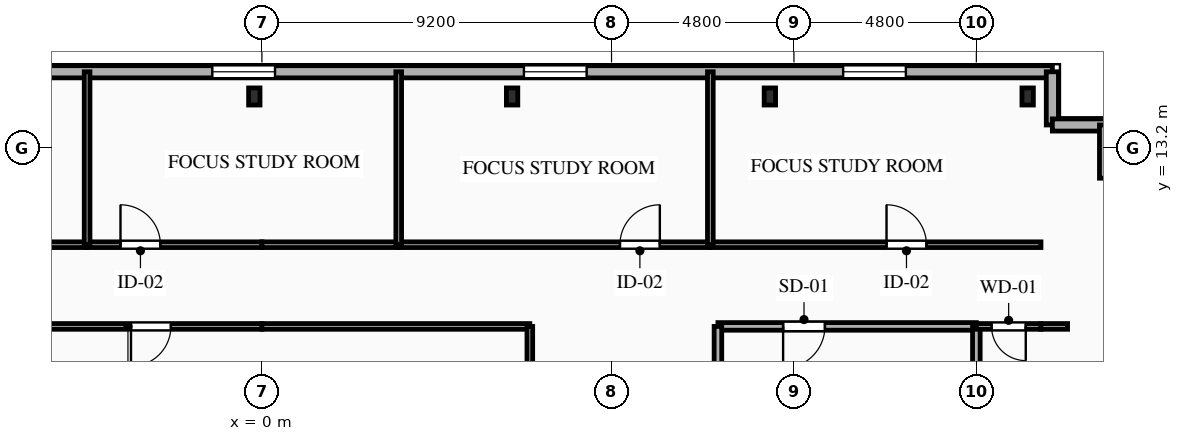
"""IFC4 building model, lengths in metres.
Left out: names, types, materials, properties, quantities, classifications, styles, units other than length and angle.
Written with IfcOpenShell. Run it as: python <this file> out.ifc"""

import sys

from ifc_helpers import new_model, si_unit, direction, frame, frame_2d, origin, origin_2d, place, context, subcontext, project, spatial, rectangle, i_section, extrude, element, fill, save


model = new_model("IFC4")
c1 = context("Model", 3, precision=1e-05, world=origin(), true_north=direction((0.0, 1.0)))
c2 = subcontext(c1, "Body", "Model", "MODEL_VIEW")
j1 = project(units=[si_unit("LENGTHUNIT", "METRE"), si_unit("PLANEANGLEUNIT", "RADIAN")], contexts=[c1])
p1 = place(None, origin())
s1 = spatial("IfcSite", under=j1, at=p1, CompositionType="ELEMENT")
p2 = place(p1, origin())
s2 = spatial("IfcBuilding", under=s1, at=p2, CompositionType="ELEMENT")
p3 = place(p2, frame((0.0, 0.0, 255.1)))
s3 = spatial("IfcBuildingStorey", under=s2, at=p3, CompositionType="ELEMENT", Elevation=255.1)
for number, where, z_axis, x_axis in (
    (1, (20.15, 14.55, 0.0), (0.0, 0.0, 1.0), (1.0, 0.0, 0.0)),
    (2, (13.367, 14.55, 0.0), (0.0, 0.0, 1.0), (1.0, 0.0, 0.0)),
    (3, (6.583, 14.55, 0.0), (0.0, 0.0, 1.0), (1.0, 0.0, 0.0)),
    (4, (-0.2, 14.55, 0.0), (0.0, 0.0, 1.0), (1.0, 0.0, 0.0)),
):
    element("IfcColumn", number, at=place(p3, frame(where, z_axis=z_axis, x_axis=x_axis)), inside=s3, PredefinedType="COLUMN", context=c2, shape_type="SweptSolid", body=[
        extrude(i_section(OverallWidth=0.3, OverallDepth=0.45, WebThickness=0.014, FlangeThickness=0.026, FilletRadius=0.027, at=origin_2d()), origin(), (0.0, 0.0, 1.0), 3.35),
    ])
p4 = place(p3, frame((-21.2, 15.2, 0.0), z_axis=(0.0, 0.0, 1.0), x_axis=(1.0, 0.0, 0.0)))
e5 = element("IfcWall", 5, at=p4, inside=s3, PredefinedType="SOLIDWALL", context=c2, shape_type="SweptSolid", body=[
    extrude(rectangle(XDim=42.0, YDim=0.32, at=frame_2d((21.0, 0.0))), origin(), (0.0, 0.0, 1.0), 3.04),
])
p5 = place(p4, frame((3.735, 0.0, 0.85)))
e6 = element("IfcOpeningElement", 6, at=p5, cuts=e5, PredefinedType="OPENING", context=c2, shape_type="SweptSolid", body=[
    extrude(rectangle(XDim=1.65, YDim=1.85, at=frame_2d((0.825, 0.925))), frame((0.0, 0.17, 0.0), z_axis=(0.0, -1.0, 0.0), x_axis=(1.0, 0.0, 0.0)), (0.0, 0.0, 1.0), 0.34),
])
p6 = place(p4, frame((12.97, 0.0, 0.85)))
e7 = element("IfcOpeningElement", 7, at=p6, cuts=e5, PredefinedType="OPENING", context=c2, shape_type="SweptSolid", body=[
    extrude(rectangle(XDim=1.5, YDim=1.85, at=frame_2d((0.75, 0.925))), frame((0.0, 0.17, 0.0), z_axis=(0.0, -1.0, 0.0), x_axis=(1.0, 0.0, 0.0)), (0.0, 0.0, 1.0), 0.34),
])
p7 = place(p4, frame((19.895, 0.0, 0.85)))
e8 = element("IfcOpeningElement", 8, at=p7, cuts=e5, PredefinedType="OPENING", context=c2, shape_type="SweptSolid", body=[
    extrude(rectangle(XDim=1.65, YDim=1.85, at=frame_2d((0.825, 0.925))), frame((0.0, 0.17, 0.0), z_axis=(0.0, -1.0, 0.0), x_axis=(1.0, 0.0, 0.0)), (0.0, 0.0, 1.0), 0.34),
])
p8 = place(p4, frame((28.095, 0.0, 0.85)))
e9 = element("IfcOpeningElement", 9, at=p8, cuts=e5, PredefinedType="OPENING", context=c2, shape_type="SweptSolid", body=[
    extrude(rectangle(XDim=1.65, YDim=1.85, at=frame_2d((0.825, 0.925))), frame((0.0, 0.17, 0.0), z_axis=(0.0, -1.0, 0.0), x_axis=(1.0, 0.0, 0.0)), (0.0, 0.0, 1.0), 0.34),
])
p9 = place(p4, frame((36.495, 0.0, 0.85)))
e10 = element("IfcOpeningElement", 10, at=p9, cuts=e5, PredefinedType="OPENING", context=c2, shape_type="SweptSolid", body=[
    extrude(rectangle(XDim=1.65, YDim=1.85, at=frame_2d((0.825, 0.925))), frame((0.0, 0.17, 0.0), z_axis=(0.0, -1.0, 0.0), x_axis=(1.0, 0.0, 0.0)), (0.0, 0.0, 1.0), 0.34),
])
for number, where, z_axis, x_axis in (
    (11, (20.8, 15.2, 0.0), (0.0, 0.0, 1.0), (0.0, -1.0, 0.0)),
    (12, (20.8, 13.8, 0.0), (0.0, 0.0, 1.0), (1.0, 0.0, 0.0)),
):
    element("IfcWall", number, at=place(p3, frame(where, z_axis=z_axis, x_axis=x_axis)), inside=s3, PredefinedType="SOLIDWALL", context=c2, shape_type="SweptSolid", body=[
        extrude(rectangle(XDim=1.4, YDim=0.32, at=frame_2d((0.7, 0.0))), origin(), (0.0, 0.0, 1.0), 3.04),
    ])
p10 = place(p3, frame((22.2, 13.8, 0.0), z_axis=(0.0, 0.0, 1.0), x_axis=(0.0, -1.0, 0.0)))
e13 = element("IfcWall", 13, at=p10, inside=s3, PredefinedType="SOLIDWALL", context=c2, shape_type="SweptSolid", body=[
    extrude(rectangle(XDim=1.4, YDim=0.32, at=frame_2d((0.7, 0.0))), origin(), (0.0, 0.0, 1.0), 3.04),
])
p11 = place(p3, frame((18.8, 8.5, 0.0), z_axis=(0.0, 0.0, 1.0), x_axis=(-1.0, 0.0, 0.0)))
e14 = element("IfcWall", 14, at=p11, inside=s3, PredefinedType="PARTITIONING", context=c2, shape_type="SweptSolid", body=[
    extrude(rectangle(XDim=6.8, YDim=0.2, at=frame_2d((3.4, 0.0))), origin(), (0.0, 0.0, 1.0), 3.04),
])
p12 = place(p11, frame((3.985, 0.0, 0.0)))
e15 = element("IfcOpeningElement", 15, at=p12, cuts=e14, PredefinedType="OPENING", context=c2, shape_type="SweptSolid", body=[
    extrude(rectangle(XDim=1.1, YDim=2.15, at=frame_2d((0.55, 1.075))), frame((0.0, 0.11, 0.0), z_axis=(0.0, -1.0, 0.0), x_axis=(1.0, 0.0, 0.0)), (0.0, 0.0, 1.0), 0.22),
])
p13 = place(p3, frame((12.0, 8.5, 0.0), z_axis=(0.0, 0.0, 1.0), x_axis=(0.0, -1.0, 0.0)))
e16 = element("IfcWall", 16, at=p13, inside=s3, PredefinedType="PARTITIONING", context=c2, shape_type="SweptSolid", body=[
    extrude(rectangle(XDim=2.9, YDim=0.2, at=frame_2d((1.45, 0.0))), origin(), (0.0, 0.0, 1.0), 3.04),
])
p14 = place(p3, frame((18.8, 5.6, 0.0), z_axis=(0.0, 0.0, 1.0), x_axis=(0.0, 1.0, 0.0)))
e17 = element("IfcWall", 17, at=p14, inside=s3, PredefinedType="PARTITIONING", context=c2, shape_type="SweptSolid", body=[
    extrude(rectangle(XDim=2.9, YDim=0.2, at=frame_2d((1.45, 0.0))), origin(), (0.0, 0.0, 1.0), 2.665),
])
p15 = place(p3, frame((-10.45, 10.65, 0.0), z_axis=(0.0, 0.0, 1.0), x_axis=(1.0, 0.0, 0.0)))
e18 = element("IfcWall", 18, at=p15, inside=s3, PredefinedType="PARTITIONING", context=c2, shape_type="SweptSolid", body=[
    extrude(rectangle(XDim=5.85, YDim=0.15, at=frame_2d((2.925, 0.0))), origin(), (0.0, 0.0, 1.0), 3.04),
])
p16 = place(p15, frame((1.048, 0.0, 0.0)))
e19 = element("IfcOpeningElement", 19, at=p16, cuts=e18, PredefinedType="OPENING", context=c2, shape_type="SweptSolid", body=[
    extrude(rectangle(XDim=0.95, YDim=2.1, at=frame_2d((0.475, 1.05))), frame((0.0, 0.085, 0.0), z_axis=(0.0, -1.0, 0.0), x_axis=(1.0, 0.0, 0.0)), (0.0, 0.0, 1.0), 0.17),
])
p17 = place(p3, frame((-4.6, 10.65, 0.0), z_axis=(0.0, 0.0, 1.0), x_axis=(1.0, 0.0, 0.0)))
e20 = element("IfcWall", 20, at=p17, inside=s3, PredefinedType="PARTITIONING", context=c2, shape_type="SweptSolid", body=[
    extrude(rectangle(XDim=4.6, YDim=0.15, at=frame_2d((2.3, 0.0))), origin(), (0.0, 0.0, 1.0), 3.04),
])
p18 = place(p17, frame((0.879, 0.0, 0.0)))
e21 = element("IfcOpeningElement", 21, at=p18, cuts=e20, PredefinedType="OPENING", context=c2, shape_type="SweptSolid", body=[
    extrude(rectangle(XDim=1.05, YDim=2.15, at=frame_2d((0.525, 1.075))), frame((0.0, 0.085, 0.0), z_axis=(0.0, -1.0, 0.0), x_axis=(1.0, 0.0, 0.0)), (0.0, 0.0, 1.0), 0.17),
])
p19 = place(p3, frame((0.0, 8.5, 0.0), z_axis=(0.0, 0.0, 1.0), x_axis=(-1.0, 0.0, 0.0)))
e22 = element("IfcWall", 22, at=p19, inside=s3, PredefinedType="PARTITIONING", context=c2, shape_type="SweptSolid", body=[
    extrude(rectangle(XDim=7.05, YDim=0.15, at=frame_2d((3.525, 0.0))), origin(), (0.0, 0.0, 1.0), 3.04),
])
p20 = place(p19, frame((2.395, 0.0, 0.0)))
e23 = element("IfcOpeningElement", 23, at=p20, cuts=e22, PredefinedType="OPENING", context=c2, shape_type="SweptSolid", body=[
    extrude(rectangle(XDim=1.05, YDim=2.15, at=frame_2d((0.525, 1.075))), frame((0.0, 0.085, 0.0), z_axis=(0.0, -1.0, 0.0), x_axis=(1.0, 0.0, 0.0)), (0.0, 0.0, 1.0), 0.17),
])
p21 = place(p3, frame((20.5, 8.5, 0.0), z_axis=(0.0, 0.0, 1.0), x_axis=(-1.0, 0.0, 0.0)))
e24 = element("IfcWall", 24, at=p21, inside=s3, PredefinedType="PARTITIONING", context=c2, shape_type="SweptSolid", body=[
    extrude(rectangle(XDim=1.7, YDim=0.15, at=frame_2d((0.85, 0.0))), origin(), (0.0, 0.0, 1.0), 3.04),
])
p22 = place(p21, frame((0.4, 0.0, 0.0)))
e25 = element("IfcOpeningElement", 25, at=p22, cuts=e24, PredefinedType="OPENING", context=c2, shape_type="SweptSolid", body=[
    extrude(rectangle(XDim=0.9, YDim=2.1, at=frame_2d((0.45, 1.05))), frame((0.0, 0.085, 0.0), z_axis=(0.0, -1.0, 0.0), x_axis=(1.0, 0.0, 0.0)), (0.0, 0.0, 1.0), 0.17),
])
p23 = place(p3, frame((21.2, 8.5, 0.0), z_axis=(0.0, 0.0, 1.0), x_axis=(-1.0, 0.0, 0.0)))
e26 = element("IfcWall", 26, at=p23, inside=s3, PredefinedType="PARTITIONING", context=c2, shape_type="SweptSolid", body=[
    extrude(rectangle(XDim=0.7, YDim=0.15, at=frame_2d((0.35, 0.0))), origin(), (0.0, 0.0, 1.0), 3.04),
])
p24 = place(p3, frame((0.0, 10.65, 0.0), z_axis=(0.0, 0.0, 1.0), x_axis=(1.0, 0.0, 0.0)))
e27 = element("IfcWall", 27, at=p24, inside=s3, PredefinedType="PARTITIONING", context=c2, shape_type="SweptSolid", body=[
    extrude(rectangle(XDim=3.6, YDim=0.15, at=frame_2d((1.8, 0.0))), origin(), (0.0, 0.0, 1.0), 3.04),
])
p25 = place(p3, frame((3.6, 10.65, 0.0), z_axis=(0.0, 0.0, 1.0), x_axis=(1.0, 0.0, 0.0)))
e28 = element("IfcWall", 28, at=p25, inside=s3, PredefinedType="PARTITIONING", context=c2, shape_type="SweptSolid", body=[
    extrude(rectangle(XDim=8.2, YDim=0.15, at=frame_2d((4.1, 0.0))), origin(), (0.0, 0.0, 1.0), 3.04),
])
p26 = place(p25, frame((5.821, 0.0, 0.0)))
e29 = element("IfcOpeningElement", 29, at=p26, cuts=e28, PredefinedType="OPENING", context=c2, shape_type="SweptSolid", body=[
    extrude(rectangle(XDim=1.05, YDim=2.15, at=frame_2d((0.525, 1.075))), frame((0.0, 0.085, 0.0), z_axis=(0.0, -1.0, 0.0), x_axis=(1.0, 0.0, 0.0)), (0.0, 0.0, 1.0), 0.17),
])
p27 = place(p3, frame((11.8, 10.65, 0.0), z_axis=(0.0, 0.0, 1.0), x_axis=(1.0, 0.0, 0.0)))
e30 = element("IfcWall", 30, at=p27, inside=s3, PredefinedType="PARTITIONING", context=c2, shape_type="SweptSolid", body=[
    extrude(rectangle(XDim=8.7, YDim=0.15, at=frame_2d((4.35, 0.0))), origin(), (0.0, 0.0, 1.0), 3.04),
])
p28 = place(p27, frame((4.636, 0.0, 0.0)))
e31 = element("IfcOpeningElement", 31, at=p28, cuts=e30, PredefinedType="OPENING", context=c2, shape_type="SweptSolid", body=[
    extrude(rectangle(XDim=1.05, YDim=2.15, at=frame_2d((0.525, 1.075))), frame((0.0, 0.085, 0.0), z_axis=(0.0, -1.0, 0.0), x_axis=(1.0, 0.0, 0.0)), (0.0, 0.0, 1.0), 0.17),
])
for number, where, z_axis, x_axis in (
    (32, (7.05, 8.5, 0.0), (0.0, 0.0, 1.0), (-1.0, 0.0, 0.0)),
    (33, (7.05, 1.45, 0.0), (0.0, 0.0, 1.0), (0.0, 1.0, 0.0)),
):
    element("IfcWall", number, at=place(p3, frame(where, z_axis=z_axis, x_axis=x_axis)), inside=s3, PredefinedType="PARTITIONING", context=c2, shape_type="SweptSolid", body=[
        extrude(rectangle(XDim=7.05, YDim=0.15, at=frame_2d((3.525, 0.0))), origin(), (0.0, 0.0, 1.0), 3.04),
    ])
for number, where, z_axis, x_axis in (
    (34, (-4.6, 15.2, 0.0), (0.0, 0.0, 1.0), (0.0, -1.0, 0.0)),
    (35, (3.6, 15.2, 0.0), (0.0, 0.0, 1.0), (0.0, -1.0, 0.0)),
    (36, (11.8, 15.2, 0.0), (0.0, 0.0, 1.0), (0.0, -1.0, 0.0)),
):
    element("IfcWall", number, at=place(p3, frame(where, z_axis=z_axis, x_axis=x_axis)), inside=s3, PredefinedType="PARTITIONING", context=c2, shape_type="SweptSolid", body=[
        extrude(rectangle(XDim=4.55, YDim=0.15, at=frame_2d((2.275, 0.0))), origin(), (0.0, 0.0, 1.0), 3.04),
    ])
p29 = place(p7, origin())
e37 = element("IfcWindow", 37, at=p29, inside=s3, PartitioningType="SINGLE_PANEL", PredefinedType="WINDOW", context=c2, shape_type="SweptSolid", body=[
    extrude(rectangle(XDim=1.65, YDim=1.85, at=frame_2d((0.825, 0.925))), frame((0.0, 0.03, 0.0), z_axis=(0.0, -1.0, 0.0), x_axis=(1.0, 0.0, 0.0)), (0.0, 0.0, 1.0), 0.06),
])
fill(e8, e37)
p30 = place(p8, origin())
e38 = element("IfcWindow", 38, at=p30, inside=s3, PartitioningType="SINGLE_PANEL", PredefinedType="WINDOW", context=c2, shape_type="SweptSolid", body=[
    extrude(rectangle(XDim=1.65, YDim=1.85, at=frame_2d((0.825, 0.925))), frame((0.0, 0.03, 0.0), z_axis=(0.0, -1.0, 0.0), x_axis=(1.0, 0.0, 0.0)), (0.0, 0.0, 1.0), 0.06),
])
fill(e9, e38)
p31 = place(p9, origin())
e39 = element("IfcWindow", 39, at=p31, inside=s3, PartitioningType="SINGLE_PANEL", PredefinedType="WINDOW", context=c2, shape_type="SweptSolid", body=[
    extrude(rectangle(XDim=1.65, YDim=1.85, at=frame_2d((0.825, 0.925))), frame((0.0, 0.03, 0.0), z_axis=(0.0, -1.0, 0.0), x_axis=(1.0, 0.0, 0.0)), (0.0, 0.0, 1.0), 0.06),
])
fill(e10, e39)
p32 = place(p12, origin())
e40 = element("IfcDoor", 40, at=p32, inside=s3, OperationType="SINGLE_SWING_RIGHT", PredefinedType="DOOR", context=c2, shape_type="SweptSolid", body=[
    extrude(rectangle(XDim=1.1, YDim=2.15, at=frame_2d((0.55, 1.075))), frame((0.0, 0.025, 0.0), z_axis=(0.0, -1.0, 0.0), x_axis=(1.0, 0.0, 0.0)), (0.0, 0.0, 1.0), 0.05),
])
fill(e15, e40)
p33 = place(p18, origin())
e41 = element("IfcDoor", 41, at=p33, inside=s3, OperationType="SINGLE_SWING_LEFT", PredefinedType="DOOR", context=c2, shape_type="SweptSolid", body=[
    extrude(rectangle(XDim=1.05, YDim=2.15, at=frame_2d((0.525, 1.075))), frame((0.0, 0.025, 0.0), z_axis=(0.0, -1.0, 0.0), x_axis=(1.0, 0.0, 0.0)), (0.0, 0.0, 1.0), 0.05),
])
fill(e21, e41)
p34 = place(p20, origin())
e42 = element("IfcDoor", 42, at=p34, inside=s3, OperationType="SINGLE_SWING_RIGHT", PredefinedType="DOOR", context=c2, shape_type="SweptSolid", body=[
    extrude(rectangle(XDim=1.05, YDim=2.15, at=frame_2d((0.525, 1.075))), frame((0.0, 0.025, 0.0), z_axis=(0.0, -1.0, 0.0), x_axis=(1.0, 0.0, 0.0)), (0.0, 0.0, 1.0), 0.05),
])
fill(e23, e42)
p35 = place(p22, origin())
e43 = element("IfcDoor", 43, at=p35, inside=s3, OperationType="SINGLE_SWING_LEFT", PredefinedType="DOOR", context=c2, shape_type="SweptSolid", body=[
    extrude(rectangle(XDim=0.9, YDim=2.1, at=frame_2d((0.45, 1.05))), frame((0.0, 0.025, 0.0), z_axis=(0.0, -1.0, 0.0), x_axis=(1.0, 0.0, 0.0)), (0.0, 0.0, 1.0), 0.05),
])
fill(e25, e43)
p36 = place(p26, origin())
e44 = element("IfcDoor", 44, at=p36, inside=s3, OperationType="SINGLE_SWING_RIGHT", PredefinedType="DOOR", context=c2, shape_type="SweptSolid", body=[
    extrude(rectangle(XDim=1.05, YDim=2.15, at=frame_2d((0.525, 1.075))), frame((0.0, 0.025, 0.0), z_axis=(0.0, -1.0, 0.0), x_axis=(1.0, 0.0, 0.0)), (0.0, 0.0, 1.0), 0.05),
])
fill(e29, e44)
p37 = place(p28, origin())
e45 = element("IfcDoor", 45, at=p37, inside=s3, OperationType="SINGLE_SWING_LEFT", PredefinedType="DOOR", context=c2, shape_type="SweptSolid", body=[
    extrude(rectangle(XDim=1.05, YDim=2.15, at=frame_2d((0.525, 1.075))), frame((0.0, 0.025, 0.0), z_axis=(0.0, -1.0, 0.0), x_axis=(1.0, 0.0, 0.0)), (0.0, 0.0, 1.0), 0.05),
])
fill(e31, e45)
save(model, sys.argv[1])
